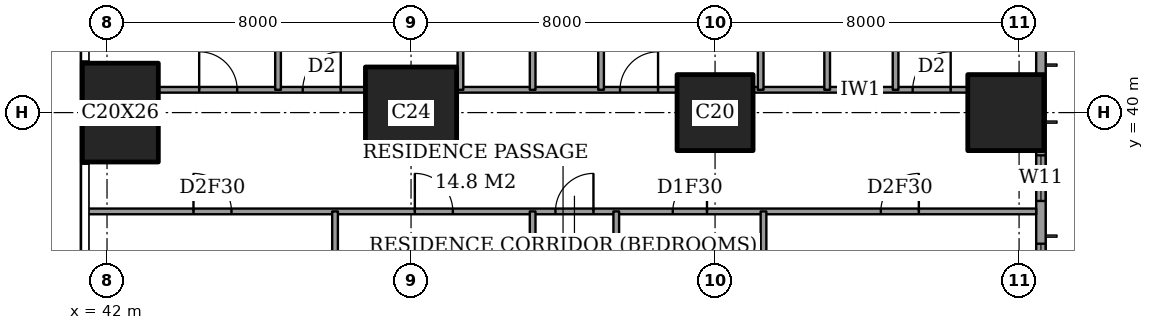
"""IFC4 building model, lengths in metres.
Left out: names, types, materials, properties, quantities, classifications, styles, units other than length and angle.
Written with IfcOpenShell. Run it as: python <this file> out.ifc"""

import sys

from ifc_helpers import new_model, si_unit, direction, frame, frame_2d, origin, origin_2d, place, context, subcontext, project, spatial, rectangle, extrude, element, fill, save


model = new_model("IFC4")
c1 = context("Model", 3, precision=1e-05, world=origin(), true_north=direction((0.0, 1.0)))
c2 = subcontext(c1, "Body", "Model", "MODEL_VIEW")
j1 = project(units=[si_unit("LENGTHUNIT", "METRE"), si_unit("PLANEANGLEUNIT", "RADIAN")], contexts=[c1])
p1 = place(None, origin())
s1 = spatial("IfcSite", under=j1, at=p1, CompositionType="ELEMENT")
p2 = place(p1, origin())
s2 = spatial("IfcBuilding", under=s1, at=p2, CompositionType="ELEMENT")
p3 = place(p2, frame((0.0, 0.0, 168.2)))
s3 = spatial("IfcBuildingStorey", under=s2, at=p3, CompositionType="ELEMENT", Elevation=168.2)
p4 = place(p3, frame((42.35, 40.0, 0.0), z_axis=(0.0, 0.0, 1.0), x_axis=(1.0, 0.0, 0.0)))
e1 = element("IfcColumn", 1, at=p4, inside=s3, PredefinedType="COLUMN", context=c2, shape_type="SweptSolid", body=[
    extrude(rectangle(XDim=2.0, YDim=2.6, at=origin_2d()), origin(), (0.0, 0.0, 1.0), 3.6),
])
p5 = place(p3, frame((50.0, 40.0, 0.0), z_axis=(0.0, 0.0, 1.0), x_axis=(1.0, 0.0, 0.0)))
e2 = element("IfcColumn", 2, at=p5, inside=s3, PredefinedType="COLUMN", context=c2, shape_type="SweptSolid", body=[
    extrude(rectangle(XDim=2.4, YDim=2.4, at=origin_2d()), origin(), (0.0, 0.0, 1.0), 3.6),
])
for number, where, z_axis, x_axis in (
    (3, (58.0, 40.0, 0.0), (0.0, 0.0, 1.0), (1.0, 0.0, 0.0)),
    (4, (65.65, 40.0, 0.0), (0.0, 0.0, 1.0), (1.0, 0.0, 0.0)),
):
    element("IfcColumn", number, at=place(p3, frame(where, z_axis=z_axis, x_axis=x_axis)), inside=s3, PredefinedType="COLUMN", context=c2, shape_type="SweptSolid", body=[
        extrude(rectangle(XDim=2.0, YDim=2.0, at=origin_2d()), origin(), (0.0, 0.0, 1.0), 3.6),
    ])
p6 = place(p3, frame((66.575, 3.175, 0.0), z_axis=(0.0, 0.0, 1.0), x_axis=(0.0, 1.0, 0.0)))
e5 = element("IfcWall", 5, at=p6, inside=s3, PredefinedType="SOLIDWALL", context=c2, shape_type="SweptSolid", body=[
    extrude(rectangle(XDim=41.65, YDim=0.25, at=frame_2d((20.825, 0.0))), origin(), (0.0, 0.0, 1.0), 3.6),
])
p7 = place(p6, frame((0.775, 0.0, 0.4)))
e6 = element("IfcOpeningElement", 6, at=p7, cuts=e5, PredefinedType="OPENING", context=c2, shape_type="SweptSolid", body=[
    extrude(rectangle(XDim=2.4, YDim=2.2, at=frame_2d((1.2, 1.1))), frame((0.0, 0.135, 0.0), z_axis=(0.0, -1.0, 0.0), x_axis=(1.0, 0.0, 0.0)), (0.0, 0.0, 1.0), 0.27),
])
p8 = place(p6, frame((6.225, 0.0, 0.4)))
e7 = element("IfcOpeningElement", 7, at=p8, cuts=e5, PredefinedType="OPENING", context=c2, shape_type="SweptSolid", body=[
    extrude(rectangle(XDim=1.2, YDim=2.2, at=frame_2d((0.6, 1.1))), frame((0.0, 0.135, 0.0), z_axis=(0.0, -1.0, 0.0), x_axis=(1.0, 0.0, 0.0)), (0.0, 0.0, 1.0), 0.27),
])
p9 = place(p6, frame((8.475, 0.0, 0.4)))
e8 = element("IfcOpeningElement", 8, at=p9, cuts=e5, PredefinedType="OPENING", context=c2, shape_type="SweptSolid", body=[
    extrude(rectangle(XDim=2.4, YDim=2.2, at=frame_2d((1.2, 1.1))), frame((0.0, 0.135, 0.0), z_axis=(0.0, -1.0, 0.0), x_axis=(1.0, 0.0, 0.0)), (0.0, 0.0, 1.0), 0.27),
])
p10 = place(p6, frame((15.775, 0.0, 0.4)))
e9 = element("IfcOpeningElement", 9, at=p10, cuts=e5, PredefinedType="OPENING", context=c2, shape_type="SweptSolid", body=[
    extrude(rectangle(XDim=2.4, YDim=2.2, at=frame_2d((1.2, 1.1))), frame((0.0, 0.135, 0.0), z_axis=(0.0, -1.0, 0.0), x_axis=(1.0, 0.0, 0.0)), (0.0, 0.0, 1.0), 0.27),
])
p11 = place(p6, frame((23.475, 0.0, 0.4)))
e10 = element("IfcOpeningElement", 10, at=p11, cuts=e5, PredefinedType="OPENING", context=c2, shape_type="SweptSolid", body=[
    extrude(rectangle(XDim=2.4, YDim=2.2, at=frame_2d((1.2, 1.1))), frame((0.0, 0.135, 0.0), z_axis=(0.0, -1.0, 0.0), x_axis=(1.0, 0.0, 0.0)), (0.0, 0.0, 1.0), 0.27),
])
p12 = place(p6, frame((30.975, 0.0, 0.4)))
e11 = element("IfcOpeningElement", 11, at=p12, cuts=e5, PredefinedType="OPENING", context=c2, shape_type="SweptSolid", body=[
    extrude(rectangle(XDim=2.4, YDim=2.2, at=frame_2d((1.2, 1.1))), frame((0.0, 0.135, 0.0), z_axis=(0.0, -1.0, 0.0), x_axis=(1.0, 0.0, 0.0)), (0.0, 0.0, 1.0), 0.27),
])
p13 = place(p6, frame((34.5, 0.0, 0.4)))
e12 = element("IfcOpeningElement", 12, at=p13, cuts=e5, PredefinedType="OPENING", context=c2, shape_type="SweptSolid", body=[
    extrude(rectangle(XDim=1.2, YDim=2.2, at=frame_2d((0.6, 1.1))), frame((0.0, 0.135, 0.0), z_axis=(0.0, -1.0, 0.0), x_axis=(1.0, 0.0, 0.0)), (0.0, 0.0, 1.0), 0.27),
])
p14 = place(p6, frame((38.475, 0.0, 0.4)))
e13 = element("IfcOpeningElement", 13, at=p14, cuts=e5, PredefinedType="OPENING", context=c2, shape_type="SweptSolid", body=[
    extrude(rectangle(XDim=2.4, YDim=2.2, at=frame_2d((1.2, 1.1))), frame((0.0, 0.135, 0.0), z_axis=(0.0, -1.0, 0.0), x_axis=(1.0, 0.0, 0.0)), (0.0, 0.0, 1.0), 0.27),
])
p15 = place(p3, frame((41.439, 37.4, 0.0), z_axis=(0.0, 0.0, 1.0), x_axis=(1.0, 0.0, 0.0)))
e14 = element("IfcWall", 14, at=p15, inside=s3, PredefinedType="PARTITIONING", context=c2, shape_type="SweptSolid", body=[
    extrude(rectangle(XDim=25.011, YDim=0.15, at=frame_2d((12.505, 0.0))), origin(), (0.0, 0.0, 1.0), 3.25),
])
p16 = place(p15, frame((12.361, 0.0, 0.0)))
e15 = element("IfcOpeningElement", 15, at=p16, cuts=e14, PredefinedType="OPENING", context=c2, shape_type="SweptSolid", body=[
    extrude(rectangle(XDim=1.0, YDim=2.1, at=frame_2d((0.5, 1.05))), frame((0.0, 0.085, 0.0), z_axis=(0.0, -1.0, 0.0), x_axis=(1.0, 0.0, 0.0)), (0.0, 0.0, 1.0), 0.17),
])
p17 = place(p15, frame((20.924, 0.0, 0.0)))
e16 = element("IfcOpeningElement", 16, at=p17, cuts=e14, PredefinedType="OPENING", context=c2, shape_type="SweptSolid", body=[
    extrude(rectangle(XDim=1.0, YDim=2.1, at=frame_2d((0.5, 1.05))), frame((0.0, 0.085, 0.0), z_axis=(0.0, -1.0, 0.0), x_axis=(1.0, 0.0, 0.0)), (0.0, 0.0, 1.0), 0.17),
])
p18 = place(p15, frame((15.448, 0.0, 0.0)))
e17 = element("IfcOpeningElement", 17, at=p18, cuts=e14, PredefinedType="OPENING", context=c2, shape_type="SweptSolid", body=[
    extrude(rectangle(XDim=0.9, YDim=2.1, at=frame_2d((0.45, 1.05))), frame((0.0, 0.085, 0.0), z_axis=(0.0, -1.0, 0.0), x_axis=(1.0, 0.0, 0.0)), (0.0, 0.0, 1.0), 0.17),
])
p19 = place(p15, frame((8.661, 0.0, 0.0)))
e18 = element("IfcOpeningElement", 18, at=p19, cuts=e14, PredefinedType="OPENING", context=c2, shape_type="SweptSolid", body=[
    extrude(rectangle(XDim=1.0, YDim=2.1, at=frame_2d((0.5, 1.05))), frame((0.0, 0.085, 0.0), z_axis=(0.0, -1.0, 0.0), x_axis=(1.0, 0.0, 0.0)), (0.0, 0.0, 1.0), 0.17),
])
p20 = place(p15, frame((2.836, 0.0, 0.0)))
e19 = element("IfcOpeningElement", 19, at=p20, cuts=e14, PredefinedType="OPENING", context=c2, shape_type="SweptSolid", body=[
    extrude(rectangle(XDim=1.0, YDim=2.1, at=frame_2d((0.5, 1.05))), frame((0.0, 0.085, 0.0), z_axis=(0.0, -1.0, 0.0), x_axis=(1.0, 0.0, 0.0)), (0.0, 0.0, 1.0), 0.17),
])
p21 = place(p3, frame((43.35, 40.6, 0.0), z_axis=(0.0, 0.0, 1.0), x_axis=(1.0, 0.0, 0.0)))
e20 = element("IfcWall", 20, at=p21, inside=s3, PredefinedType="PARTITIONING", context=c2, shape_type="SweptSolid", body=[
    extrude(rectangle(XDim=5.45, YDim=0.15, at=frame_2d((2.725, 0.0))), origin(), (0.0, 0.0, 1.0), 3.25),
])
p22 = place(p21, frame((3.8, 0.0, 0.0)))
e21 = element("IfcOpeningElement", 21, at=p22, cuts=e20, PredefinedType="OPENING", context=c2, shape_type="SweptSolid", body=[
    extrude(rectangle(XDim=1.0, YDim=2.1, at=frame_2d((0.5, 1.05))), frame((0.0, 0.085, 0.0), z_axis=(0.0, -1.0, 0.0), x_axis=(1.0, 0.0, 0.0)), (0.0, 0.0, 1.0), 0.17),
])
p23 = place(p21, frame((1.075, 0.0, 0.0)))
e22 = element("IfcOpeningElement", 22, at=p23, cuts=e20, PredefinedType="OPENING", context=c2, shape_type="SweptSolid", body=[
    extrude(rectangle(XDim=1.0, YDim=2.1, at=frame_2d((0.5, 1.05))), frame((0.0, 0.085, 0.0), z_axis=(0.0, -1.0, 0.0), x_axis=(1.0, 0.0, 0.0)), (0.0, 0.0, 1.0), 0.17),
])
p24 = place(p3, frame((51.2, 40.6, 0.0), z_axis=(0.0, 0.0, 1.0), x_axis=(1.0, 0.0, 0.0)))
e23 = element("IfcWall", 23, at=p24, inside=s3, PredefinedType="PARTITIONING", context=c2, shape_type="SweptSolid", body=[
    extrude(rectangle(XDim=5.8, YDim=0.15, at=frame_2d((2.9, 0.0))), origin(), (0.0, 0.0, 1.0), 3.25),
])
p25 = place(p24, frame((4.3, 0.0, 0.0)))
e24 = element("IfcOpeningElement", 24, at=p25, cuts=e23, PredefinedType="OPENING", context=c2, shape_type="SweptSolid", body=[
    extrude(rectangle(XDim=1.0, YDim=2.1, at=frame_2d((0.5, 1.05))), frame((0.0, 0.085, 0.0), z_axis=(0.0, -1.0, 0.0), x_axis=(1.0, 0.0, 0.0)), (0.0, 0.0, 1.0), 0.17),
])
p26 = place(p3, frame((59.0, 40.6, 0.0), z_axis=(0.0, 0.0, 1.0), x_axis=(1.0, 0.0, 0.0)))
e25 = element("IfcWall", 25, at=p26, inside=s3, PredefinedType="PARTITIONING", context=c2, shape_type="SweptSolid", body=[
    extrude(rectangle(XDim=5.65, YDim=0.15, at=frame_2d((2.825, 0.0))), origin(), (0.0, 0.0, 1.0), 3.25),
])
p27 = place(p26, frame((4.2, 0.0, 0.0)))
e26 = element("IfcOpeningElement", 26, at=p27, cuts=e25, PredefinedType="OPENING", context=c2, shape_type="SweptSolid", body=[
    extrude(rectangle(XDim=1.0, YDim=2.1, at=frame_2d((0.5, 1.05))), frame((0.0, 0.085, 0.0), z_axis=(0.0, -1.0, 0.0), x_axis=(1.0, 0.0, 0.0)), (0.0, 0.0, 1.0), 0.17),
])
p28 = place(p3, frame((46.5, 40.6, 0.0), z_axis=(0.0, 0.0, 1.0), x_axis=(0.0, 1.0, 0.0)))
e27 = element("IfcWall", 27, at=p28, inside=s3, PredefinedType="PARTITIONING", context=c2, shape_type="SweptSolid", body=[
    extrude(rectangle(XDim=7.85, YDim=0.15, at=frame_2d((3.925, 0.0))), origin(), (0.0, 0.0, 1.0), 3.25),
])
p29 = place(p3, frame((48.0, 28.0, 0.0), z_axis=(0.0, 0.0, 1.0), x_axis=(0.0, 1.0, 0.0)))
e28 = element("IfcWall", 28, at=p29, inside=s3, PredefinedType="PARTITIONING", context=c2, shape_type="SweptSolid", body=[
    extrude(rectangle(XDim=9.4, YDim=0.15, at=frame_2d((4.7, 0.0))), origin(), (0.0, 0.0, 1.0), 3.25),
])
p30 = place(p29, frame((0.837, 0.0, 0.0)))
e29 = element("IfcOpeningElement", 29, at=p30, cuts=e28, PredefinedType="OPENING", context=c2, shape_type="SweptSolid", body=[
    extrude(rectangle(XDim=1.0, YDim=2.1, at=frame_2d((0.5, 1.05))), frame((0.0, 0.085, 0.0), z_axis=(0.0, -1.0, 0.0), x_axis=(1.0, 0.0, 0.0)), (0.0, 0.0, 1.0), 0.17),
])
p31 = place(p3, frame((51.3, 40.6, 0.0), z_axis=(0.0, 0.0, 1.0), x_axis=(0.0, 1.0, 0.0)))
e30 = element("IfcWall", 30, at=p31, inside=s3, PredefinedType="PARTITIONING", context=c2, shape_type="SweptSolid", body=[
    extrude(rectangle(XDim=7.85, YDim=0.15, at=frame_2d((3.925, 0.0))), origin(), (0.0, 0.0, 1.0), 3.25),
])
p32 = place(p31, frame((3.475, 0.0, 0.0)))
e31 = element("IfcOpeningElement", 31, at=p32, cuts=e30, PredefinedType="OPENING", context=c2, shape_type="SweptSolid", body=[
    extrude(rectangle(XDim=0.9, YDim=2.1, at=frame_2d((0.45, 1.05))), frame((0.0, 0.085, 0.0), z_axis=(0.0, -1.0, 0.0), x_axis=(1.0, 0.0, 0.0)), (0.0, 0.0, 1.0), 0.17),
])
p33 = place(p3, frame((53.2, 30.675, 0.0), z_axis=(0.0, 0.0, 1.0), x_axis=(0.0, 1.0, 0.0)))
e32 = element("IfcWall", 32, at=p33, inside=s3, PredefinedType="PARTITIONING", context=c2, shape_type="SweptSolid", body=[
    extrude(rectangle(XDim=6.725, YDim=0.15, at=frame_2d((3.362, 0.0))), origin(), (0.0, 0.0, 1.0), 3.25),
])
p34 = place(p3, frame((53.2, 40.6, 0.0), z_axis=(0.0, 0.0, 1.0), x_axis=(0.0, 1.0, 0.0)))
e33 = element("IfcWall", 33, at=p34, inside=s3, PredefinedType="PARTITIONING", context=c2, shape_type="SweptSolid", body=[
    extrude(rectangle(XDim=7.85, YDim=0.15, at=frame_2d((3.925, 0.0))), origin(), (0.0, 0.0, 1.0), 3.25),
])
p35 = place(p3, frame((55.0, 40.6, 0.0), z_axis=(0.0, 0.0, 1.0), x_axis=(0.0, 1.0, 0.0)))
e34 = element("IfcWall", 34, at=p35, inside=s3, PredefinedType="PARTITIONING", context=c2, shape_type="SweptSolid", body=[
    extrude(rectangle(XDim=7.85, YDim=0.15, at=frame_2d((3.925, 0.0))), origin(), (0.0, 0.0, 1.0), 3.25),
])
p36 = place(p35, frame((3.475, 0.0, 0.0)))
e35 = element("IfcOpeningElement", 35, at=p36, cuts=e34, PredefinedType="OPENING", context=c2, shape_type="SweptSolid", body=[
    extrude(rectangle(XDim=0.9, YDim=2.1, at=frame_2d((0.45, 1.05))), frame((0.0, 0.085, 0.0), z_axis=(0.0, -1.0, 0.0), x_axis=(1.0, 0.0, 0.0)), (0.0, 0.0, 1.0), 0.17),
])
p37 = place(p3, frame((55.4, 28.0, 0.0), z_axis=(0.0, 0.0, 1.0), x_axis=(0.0, 1.0, 0.0)))
e36 = element("IfcWall", 36, at=p37, inside=s3, PredefinedType="PARTITIONING", context=c2, shape_type="SweptSolid", body=[
    extrude(rectangle(XDim=9.4, YDim=0.15, at=frame_2d((4.7, 0.0))), origin(), (0.0, 0.0, 1.0), 3.25),
])
p38 = place(p37, frame((0.837, 0.0, 0.0)))
e37 = element("IfcOpeningElement", 37, at=p38, cuts=e36, PredefinedType="OPENING", context=c2, shape_type="SweptSolid", body=[
    extrude(rectangle(XDim=1.0, YDim=2.1, at=frame_2d((0.5, 1.05))), frame((0.0, 0.085, 0.0), z_axis=(0.0, -1.0, 0.0), x_axis=(1.0, 0.0, 0.0)), (0.0, 0.0, 1.0), 0.17),
])
p39 = place(p3, frame((59.2, 40.6, 0.0), z_axis=(0.0, 0.0, 1.0), x_axis=(0.0, 1.0, 0.0)))
e38 = element("IfcWall", 38, at=p39, inside=s3, PredefinedType="PARTITIONING", context=c2, shape_type="SweptSolid", body=[
    extrude(rectangle(XDim=7.85, YDim=0.15, at=frame_2d((3.925, 0.0))), origin(), (0.0, 0.0, 1.0), 3.25),
])
p40 = place(p3, frame((59.275, 33.2, 0.0), z_axis=(0.0, 0.0, 1.0), x_axis=(0.0, 1.0, 0.0)))
e39 = element("IfcWall", 39, at=p40, inside=s3, PredefinedType="PARTITIONING", context=c2, shape_type="SweptSolid", body=[
    extrude(rectangle(XDim=4.2, YDim=0.15, at=frame_2d((2.1, 0.0))), origin(), (0.0, 0.0, 1.0), 3.25),
])
p41 = place(p3, frame((60.95, 40.6, 0.0), z_axis=(0.0, 0.0, 1.0), x_axis=(0.0, 1.0, 0.0)))
e40 = element("IfcWall", 40, at=p41, inside=s3, PredefinedType="PARTITIONING", context=c2, shape_type="SweptSolid", body=[
    extrude(rectangle(XDim=7.85, YDim=0.15, at=frame_2d((3.925, 0.0))), origin(), (0.0, 0.0, 1.0), 3.25),
])
p42 = place(p41, frame((5.225, 0.0, 0.0)))
e41 = element("IfcOpeningElement", 41, at=p42, cuts=e40, PredefinedType="OPENING", context=c2, shape_type="SweptSolid", body=[
    extrude(rectangle(XDim=0.9, YDim=2.1, at=frame_2d((0.45, 1.05))), frame((0.0, 0.085, 0.0), z_axis=(0.0, -1.0, 0.0), x_axis=(1.0, 0.0, 0.0)), (0.0, 0.0, 1.0), 0.17),
])
p43 = place(p3, frame((62.75, 40.6, 0.0), z_axis=(0.0, 0.0, 1.0), x_axis=(0.0, 1.0, 0.0)))
e42 = element("IfcWall", 42, at=p43, inside=s3, PredefinedType="PARTITIONING", context=c2, shape_type="SweptSolid", body=[
    extrude(rectangle(XDim=3.5, YDim=0.15, at=frame_2d((1.75, 0.0))), origin(), (0.0, 0.0, 1.0), 3.25),
])
p44 = place(p43, frame((1.3, 0.0, 0.0)))
e43 = element("IfcOpeningElement", 43, at=p44, cuts=e42, PredefinedType="OPENING", context=c2, shape_type="SweptSolid", body=[
    extrude(rectangle(XDim=0.9, YDim=2.1, at=frame_2d((0.45, 1.05))), frame((0.0, 0.085, 0.0), z_axis=(0.0, -1.0, 0.0), x_axis=(1.0, 0.0, 0.0)), (0.0, 0.0, 1.0), 0.17),
])
p45 = place(p12, origin())
e44 = element("IfcWindow", 44, at=p45, inside=s3, PartitioningType="SINGLE_PANEL", PredefinedType="WINDOW", context=c2, shape_type="SweptSolid", body=[
    extrude(rectangle(XDim=2.4, YDim=2.2, at=frame_2d((1.2, 1.1))), frame((0.0, 0.03, 0.0), z_axis=(0.0, -1.0, 0.0), x_axis=(1.0, 0.0, 0.0)), (0.0, 0.0, 1.0), 0.06),
])
fill(e11, e44)
p46 = place(p13, origin())
e45 = element("IfcWindow", 45, at=p46, inside=s3, PartitioningType="SINGLE_PANEL", PredefinedType="WINDOW", context=c2, shape_type="SweptSolid", body=[
    extrude(rectangle(XDim=1.2, YDim=2.2, at=frame_2d((0.6, 1.1))), frame((0.0, 0.03, 0.0), z_axis=(0.0, -1.0, 0.0), x_axis=(1.0, 0.0, 0.0)), (0.0, 0.0, 1.0), 0.06),
])
fill(e12, e45)
p47 = place(p27, origin())
e46 = element("IfcDoor", 46, at=p47, inside=s3, OperationType="SINGLE_SWING_LEFT", PredefinedType="DOOR", context=c2, shape_type="SweptSolid", body=[
    extrude(rectangle(XDim=1.0, YDim=2.1, at=frame_2d((0.5, 1.05))), frame((0.0, 0.025, 0.0), z_axis=(0.0, -1.0, 0.0), x_axis=(1.0, 0.0, 0.0)), (0.0, 0.0, 1.0), 0.05),
])
fill(e26, e46)
p48 = place(p25, origin())
e47 = element("IfcDoor", 47, at=p48, inside=s3, OperationType="SINGLE_SWING_LEFT", PredefinedType="DOOR", context=c2, shape_type="SweptSolid", body=[
    extrude(rectangle(XDim=1.0, YDim=2.1, at=frame_2d((0.5, 1.05))), frame((0.0, 0.025, 0.0), z_axis=(0.0, -1.0, 0.0), x_axis=(1.0, 0.0, 0.0)), (0.0, 0.0, 1.0), 0.05),
])
fill(e24, e47)
p49 = place(p22, origin())
e48 = element("IfcDoor", 48, at=p49, inside=s3, OperationType="SINGLE_SWING_LEFT", PredefinedType="DOOR", context=c2, shape_type="SweptSolid", body=[
    extrude(rectangle(XDim=1.0, YDim=2.1, at=frame_2d((0.5, 1.05))), frame((0.0, 0.025, 0.0), z_axis=(0.0, -1.0, 0.0), x_axis=(1.0, 0.0, 0.0)), (0.0, 0.0, 1.0), 0.05),
])
fill(e21, e48)
p50 = place(p23, origin())
e49 = element("IfcDoor", 49, at=p50, inside=s3, OperationType="SINGLE_SWING_RIGHT", PredefinedType="DOOR", context=c2, shape_type="SweptSolid", body=[
    extrude(rectangle(XDim=1.0, YDim=2.1, at=frame_2d((0.5, 1.05))), frame((0.0, 0.025, 0.0), z_axis=(0.0, -1.0, 0.0), x_axis=(1.0, 0.0, 0.0)), (0.0, 0.0, 1.0), 0.05),
])
fill(e22, e49)
p51 = place(p16, origin())
e50 = element("IfcDoor", 50, at=p51, inside=s3, OperationType="SINGLE_SWING_LEFT", PredefinedType="DOOR", context=c2, shape_type="SweptSolid", body=[
    extrude(rectangle(XDim=1.0, YDim=2.1, at=frame_2d((0.5, 1.05))), frame((0.0, 0.025, 0.0), z_axis=(0.0, -1.0, 0.0), x_axis=(1.0, 0.0, 0.0)), (0.0, 0.0, 1.0), 0.05),
])
fill(e15, e50)
p52 = place(p17, origin())
e51 = element("IfcDoor", 51, at=p52, inside=s3, OperationType="SINGLE_SWING_LEFT", PredefinedType="DOOR", context=c2, shape_type="SweptSolid", body=[
    extrude(rectangle(XDim=1.0, YDim=2.1, at=frame_2d((0.5, 1.05))), frame((0.0, 0.025, 0.0), z_axis=(0.0, -1.0, 0.0), x_axis=(1.0, 0.0, 0.0)), (0.0, 0.0, 1.0), 0.05),
])
fill(e16, e51)
p53 = place(p18, origin())
e52 = element("IfcDoor", 52, at=p53, inside=s3, OperationType="SINGLE_SWING_LEFT", PredefinedType="DOOR", context=c2, shape_type="SweptSolid", body=[
    extrude(rectangle(XDim=0.9, YDim=2.1, at=frame_2d((0.45, 1.05))), frame((0.0, 0.025, 0.0), z_axis=(0.0, -1.0, 0.0), x_axis=(1.0, 0.0, 0.0)), (0.0, 0.0, 1.0), 0.05),
])
fill(e17, e52)
p54 = place(p19, origin())
e53 = element("IfcDoor", 53, at=p54, inside=s3, OperationType="SINGLE_SWING_RIGHT", PredefinedType="DOOR", context=c2, shape_type="SweptSolid", body=[
    extrude(rectangle(XDim=1.0, YDim=2.1, at=frame_2d((0.5, 1.05))), frame((0.0, 0.025, 0.0), z_axis=(0.0, -1.0, 0.0), x_axis=(1.0, 0.0, 0.0)), (0.0, 0.0, 1.0), 0.05),
])
fill(e18, e53)
p55 = place(p20, origin())
e54 = element("IfcDoor", 54, at=p55, inside=s3, OperationType="SINGLE_SWING_RIGHT", PredefinedType="DOOR", context=c2, shape_type="SweptSolid", body=[
    extrude(rectangle(XDim=1.0, YDim=2.1, at=frame_2d((0.5, 1.05))), frame((0.0, 0.025, 0.0), z_axis=(0.0, -1.0, 0.0), x_axis=(1.0, 0.0, 0.0)), (0.0, 0.0, 1.0), 0.05),
])
fill(e19, e54)
save(model, sys.argv[1])
